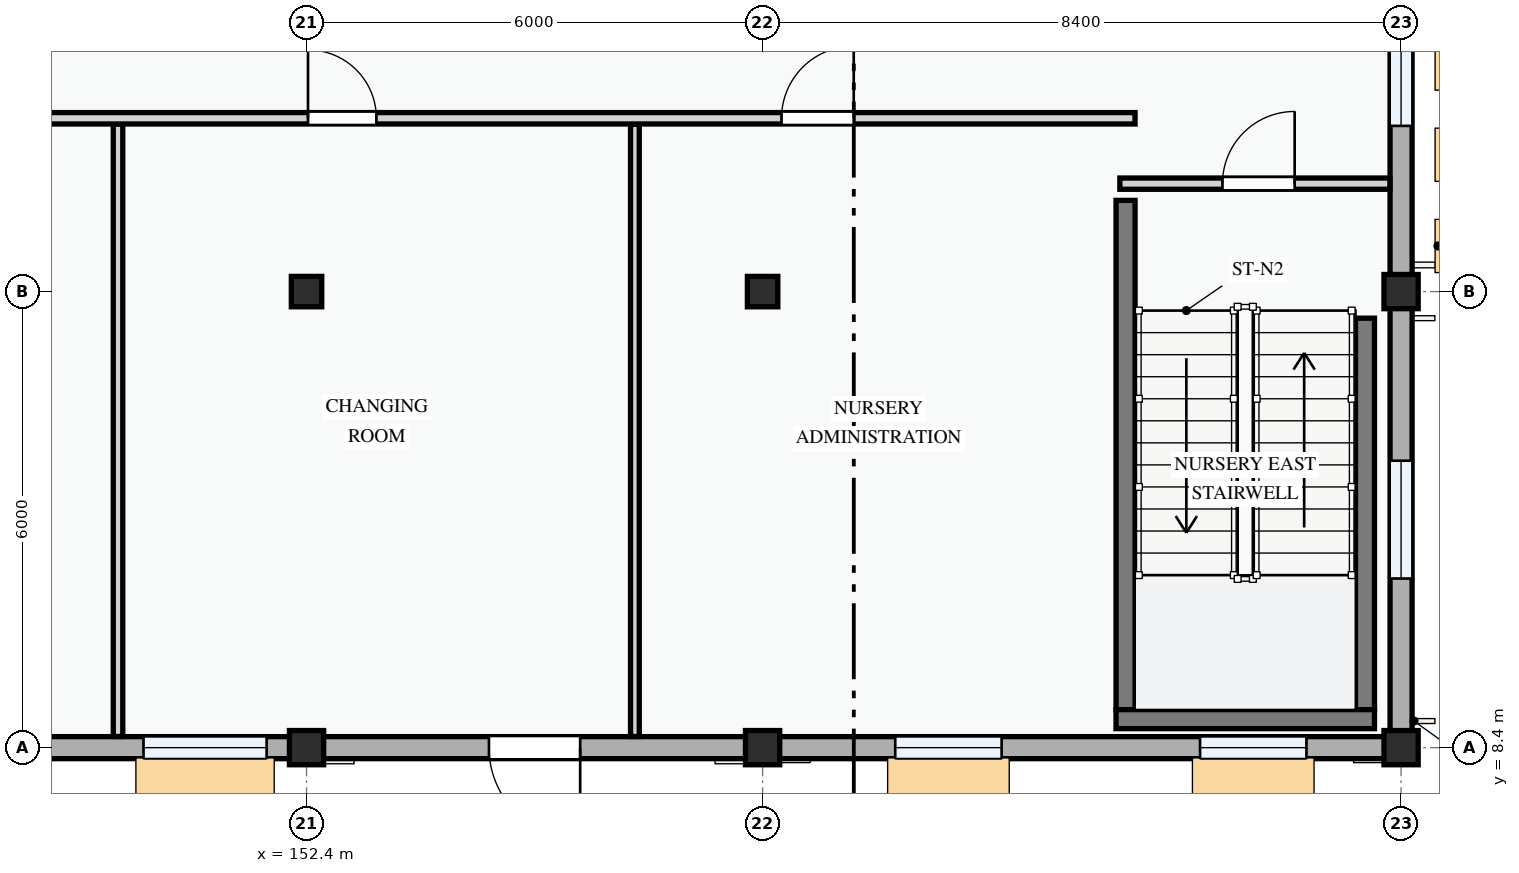
"""IFC4 building model, lengths in metres.
Left out: names, types, materials, properties, quantities, classifications, styles, units other than length and angle.
Written with IfcOpenShell. Run it as: python <this file> out.ifc"""

import sys

from ifc_helpers import new_model, si_unit, direction, frame, frame_2d, origin, origin_2d, place, context, subcontext, project, spatial, rectangle, extrude, element, fill, save


model = new_model("IFC4")
c1 = context("Model", 3, precision=1e-05, world=origin(), true_north=direction((0.0, 1.0)))
c2 = subcontext(c1, "Body", "Model", "MODEL_VIEW")
j1 = project(units=[si_unit("LENGTHUNIT", "METRE"), si_unit("PLANEANGLEUNIT", "RADIAN")], contexts=[c1])
p1 = place(None, origin())
s1 = spatial("IfcSite", under=j1, at=p1, CompositionType="ELEMENT")
p2 = place(p1, origin())
s2 = spatial("IfcBuilding", under=s1, at=p2, CompositionType="ELEMENT")
p3 = place(p2, origin())
s3 = spatial("IfcBuildingStorey", under=s2, at=p3, CompositionType="ELEMENT", Elevation=0.0)
p4 = place(p3, frame((152.4, 8.4, 0.0), z_axis=(0.0, 0.0, 1.0), x_axis=(1.0, 0.0, 0.0)))
e1 = element("IfcColumn", 1, at=p4, inside=s3, PredefinedType="COLUMN", context=c2, shape_type="SweptSolid", body=[
    extrude(rectangle(XDim=0.45, YDim=0.45, at=origin_2d()), origin(), (0.0, 0.0, 1.0), 4.5),
])
p5 = place(p3, frame((152.4, 14.4, 0.0), z_axis=(0.0, 0.0, 1.0), x_axis=(1.0, 0.0, 0.0)))
e2 = element("IfcColumn", 2, at=p5, inside=s3, PredefinedType="COLUMN", context=c2, shape_type="SweptSolid", body=[
    extrude(rectangle(XDim=0.4, YDim=0.4, at=origin_2d()), origin(), (0.0, 0.0, 1.0), 4.5),
])
p6 = place(p3, frame((158.4, 8.4, 0.0), z_axis=(0.0, 0.0, 1.0), x_axis=(1.0, 0.0, 0.0)))
e3 = element("IfcColumn", 3, at=p6, inside=s3, PredefinedType="COLUMN", context=c2, shape_type="SweptSolid", body=[
    extrude(rectangle(XDim=0.45, YDim=0.45, at=origin_2d()), origin(), (0.0, 0.0, 1.0), 4.5),
])
p7 = place(p3, frame((158.4, 14.4, 0.0), z_axis=(0.0, 0.0, 1.0), x_axis=(1.0, 0.0, 0.0)))
e4 = element("IfcColumn", 4, at=p7, inside=s3, PredefinedType="COLUMN", context=c2, shape_type="SweptSolid", body=[
    extrude(rectangle(XDim=0.4, YDim=0.4, at=origin_2d()), origin(), (0.0, 0.0, 1.0), 4.5),
])
for number, where, z_axis, x_axis in (
    (5, (166.8, 8.4, 0.0), (0.0, 0.0, 1.0), (1.0, 0.0, 0.0)),
    (6, (166.8, 14.4, 0.0), (0.0, 0.0, 1.0), (1.0, 0.0, 0.0)),
):
    element("IfcColumn", number, at=place(p3, frame(where, z_axis=z_axis, x_axis=x_axis)), inside=s3, PredefinedType="COLUMN", context=c2, shape_type="SweptSolid", body=[
        extrude(rectangle(XDim=0.45, YDim=0.45, at=origin_2d()), origin(), (0.0, 0.0, 1.0), 4.5),
    ])
p8 = place(p3, frame((144.0, 8.4, 0.0), z_axis=(0.0, 0.0, 1.0), x_axis=(1.0, 0.0, 0.0)))
e7 = element("IfcWall", 7, at=p8, inside=s3, PredefinedType="STANDARD", context=c2, shape_type="SweptSolid", body=[
    extrude(rectangle(XDim=8.4, YDim=0.29, at=frame_2d((4.2, 0.0))), origin(), (0.0, 0.0, 1.0), 3.485),
])
p9 = place(p8, frame((2.455, 0.0, 0.72)))
e8 = element("IfcOpeningElement", 8, at=p9, cuts=e7, PredefinedType="OPENING", context=c2, shape_type="SweptSolid", body=[
    extrude(rectangle(XDim=1.2, YDim=1.35, at=frame_2d((0.6, 0.675))), frame((0.0, 0.155, 0.0), z_axis=(0.0, -1.0, 0.0), x_axis=(1.0, 0.0, 0.0)), (0.0, 0.0, 1.0), 0.31),
])
p10 = place(p8, frame((6.255, 0.0, 0.72)))
e9 = element("IfcOpeningElement", 9, at=p10, cuts=e7, PredefinedType="OPENING", context=c2, shape_type="SweptSolid", body=[
    extrude(rectangle(XDim=1.62, YDim=1.38, at=frame_2d((0.81, 0.69))), frame((0.0, 0.155, 0.0), z_axis=(0.0, -1.0, 0.0), x_axis=(1.0, 0.0, 0.0)), (0.0, 0.0, 1.0), 0.31),
])
p11 = place(p3, frame((152.4, 8.4, 0.0), z_axis=(0.0, 0.0, 1.0), x_axis=(1.0, 0.0, 0.0)))
e10 = element("IfcWall", 10, at=p11, inside=s3, PredefinedType="STANDARD", context=c2, shape_type="SweptSolid", body=[
    extrude(rectangle(XDim=6.0, YDim=0.29, at=frame_2d((3.0, 0.0))), origin(), (0.0, 0.0, 1.0), 3.585),
])
p12 = place(p11, frame((2.4, 0.0, 0.0)))
e11 = element("IfcOpeningElement", 11, at=p12, cuts=e10, PredefinedType="OPENING", context=c2, shape_type="SweptSolid", body=[
    extrude(rectangle(XDim=1.2, YDim=2.2, at=frame_2d((0.6, 1.1))), frame((0.0, 0.155, 0.0), z_axis=(0.0, -1.0, 0.0), x_axis=(1.0, 0.0, 0.0)), (0.0, 0.0, 1.0), 0.31),
])
p13 = place(p3, frame((158.4, 8.4, 0.0), z_axis=(0.0, 0.0, 1.0), x_axis=(1.0, 0.0, 0.0)))
e12 = element("IfcWall", 12, at=p13, inside=s3, PredefinedType="STANDARD", context=c2, shape_type="SweptSolid", body=[
    extrude(rectangle(XDim=8.4, YDim=0.29, at=frame_2d((4.2, 0.0))), origin(), (0.0, 0.0, 1.0), 3.485),
])
p14 = place(p13, frame((1.745, 0.0, 0.72)))
e13 = element("IfcOpeningElement", 13, at=p14, cuts=e12, PredefinedType="OPENING", context=c2, shape_type="SweptSolid", body=[
    extrude(rectangle(XDim=1.4, YDim=1.45, at=frame_2d((0.7, 0.725))), frame((0.0, 0.155, 0.0), z_axis=(0.0, -1.0, 0.0), x_axis=(1.0, 0.0, 0.0)), (0.0, 0.0, 1.0), 0.31),
])
p15 = place(p13, frame((5.755, 0.0, 0.72)))
e14 = element("IfcOpeningElement", 14, at=p15, cuts=e12, PredefinedType="OPENING", context=c2, shape_type="SweptSolid", body=[
    extrude(rectangle(XDim=1.4, YDim=1.45, at=frame_2d((0.7, 0.725))), frame((0.0, 0.155, 0.0), z_axis=(0.0, -1.0, 0.0), x_axis=(1.0, 0.0, 0.0)), (0.0, 0.0, 1.0), 0.31),
])
p16 = place(p3, frame((166.8, 8.4, 0.0), z_axis=(0.0, 0.0, 1.0), x_axis=(0.0, 1.0, 0.0)))
e15 = element("IfcWall", 15, at=p16, inside=s3, PredefinedType="STANDARD", context=c2, shape_type="SweptSolid", body=[
    extrude(rectangle(XDim=6.0, YDim=0.29, at=frame_2d((3.0, 0.0))), origin(), (0.0, 0.0, 1.0), 3.585),
])
p17 = place(p16, frame((2.225, 0.0, 0.72)))
e16 = element("IfcOpeningElement", 16, at=p17, cuts=e15, PredefinedType="OPENING", context=c2, shape_type="SweptSolid", body=[
    extrude(rectangle(XDim=1.55, YDim=1.4, at=frame_2d((0.775, 0.7))), frame((0.0, 0.155, 0.0), z_axis=(0.0, -1.0, 0.0), x_axis=(1.0, 0.0, 0.0)), (0.0, 0.0, 1.0), 0.31),
])
p18 = place(p3, frame((166.8, 14.4, 0.0), z_axis=(0.0, 0.0, 1.0), x_axis=(0.0, 1.0, 0.0)))
e17 = element("IfcWall", 17, at=p18, inside=s3, PredefinedType="STANDARD", context=c2, shape_type="SweptSolid", body=[
    extrude(rectangle(XDim=8.4, YDim=0.29, at=frame_2d((4.2, 0.0))), origin(), (0.0, 0.0, 1.0), 3.485),
])
p19 = place(p18, frame((2.18, 0.0, 0.72)))
e18 = element("IfcOpeningElement", 18, at=p19, cuts=e17, PredefinedType="OPENING", context=c2, shape_type="SweptSolid", body=[
    extrude(rectangle(XDim=1.58, YDim=1.48, at=frame_2d((0.79, 0.74))), frame((0.0, 0.155, 0.0), z_axis=(0.0, -1.0, 0.0), x_axis=(1.0, 0.0, 0.0)), (0.0, 0.0, 1.0), 0.31),
])
p20 = place(p18, frame((5.49, 0.0, 0.72)))
e19 = element("IfcOpeningElement", 19, at=p20, cuts=e17, PredefinedType="OPENING", context=c2, shape_type="SweptSolid", body=[
    extrude(rectangle(XDim=1.75, YDim=1.45, at=frame_2d((0.875, 0.725))), frame((0.0, 0.155, 0.0), z_axis=(0.0, -1.0, 0.0), x_axis=(1.0, 0.0, 0.0)), (0.0, 0.0, 1.0), 0.31),
])
p21 = place(p3, frame((163.175, 15.6, 0.0), z_axis=(0.0, 0.0, 1.0), x_axis=(0.0, -1.0, 0.0)))
e20 = element("IfcWall", 20, at=p21, inside=s3, PredefinedType="SHEAR", context=c2, shape_type="SweptSolid", body=[
    extrude(rectangle(XDim=6.7, YDim=0.25, at=frame_2d((3.35, 0.0))), origin(), (0.0, 0.0, 1.0), 4.2),
])
p22 = place(p3, frame((166.325, 14.05, 0.0), z_axis=(0.0, 0.0, 1.0), x_axis=(0.0, -1.0, 0.0)))
e21 = element("IfcWall", 21, at=p22, inside=s3, PredefinedType="SHEAR", context=c2, shape_type="SweptSolid", body=[
    extrude(rectangle(XDim=5.15, YDim=0.25, at=frame_2d((2.575, 0.0))), origin(), (0.0, 0.0, 1.0), 4.2),
])
p23 = place(p3, frame((163.05, 8.775, 0.0), z_axis=(0.0, 0.0, 1.0), x_axis=(1.0, 0.0, 0.0)))
e22 = element("IfcWall", 22, at=p23, inside=s3, PredefinedType="SHEAR", context=c2, shape_type="SweptSolid", body=[
    extrude(rectangle(XDim=3.4, YDim=0.25, at=frame_2d((1.7, 0.0))), origin(), (0.0, 0.0, 1.0), 4.2),
])
p24 = place(p3, frame((149.92, 8.547, 0.0), z_axis=(0.0, 0.0, 1.0), x_axis=(0.0, 1.0, 0.0)))
e23 = element("IfcWall", 23, at=p24, inside=s3, PredefinedType="PARTITIONING", context=c2, shape_type="SweptSolid", body=[
    extrude(rectangle(XDim=8.056, YDim=0.125, at=frame_2d((4.028, 0.0))), origin(), (0.0, 0.0, 1.0), 4.2),
])
p25 = place(p3, frame((156.72, 8.547, 0.0), z_axis=(0.0, 0.0, 1.0), x_axis=(0.0, 1.0, 0.0)))
e24 = element("IfcWall", 24, at=p25, inside=s3, PredefinedType="PARTITIONING", context=c2, shape_type="SweptSolid", body=[
    extrude(rectangle(XDim=8.056, YDim=0.115, at=frame_2d((4.028, 0.0))), origin(), (0.0, 0.0, 1.0), 4.2),
])
p26 = place(p3, frame((127.1, 16.68, 0.0), z_axis=(0.0, 0.0, 1.0), x_axis=(1.0, 0.0, 0.0)))
e25 = element("IfcWall", 25, at=p26, inside=s3, PredefinedType="PARTITIONING", context=c2, shape_type="SweptSolid", body=[
    extrude(rectangle(XDim=36.2, YDim=0.15, at=frame_2d((18.1, 0.0))), origin(), (0.0, 0.0, 1.0), 4.2),
])
p27 = place(p26, frame((7.878, 0.0, 0.0)))
e26 = element("IfcOpeningElement", 26, at=p27, cuts=e25, PredefinedType="OPENING", context=c2, shape_type="SweptSolid", body=[
    extrude(rectangle(XDim=0.95, YDim=2.1, at=frame_2d((0.475, 1.05))), frame((0.0, 0.085, 0.0), z_axis=(0.0, -1.0, 0.0), x_axis=(1.0, 0.0, 0.0)), (0.0, 0.0, 1.0), 0.17),
])
p28 = place(p26, frame((17.65, 0.0, 0.0)))
e27 = element("IfcOpeningElement", 27, at=p28, cuts=e25, PredefinedType="OPENING", context=c2, shape_type="SweptSolid", body=[
    extrude(rectangle(XDim=0.9, YDim=2.1, at=frame_2d((0.45, 1.05))), frame((0.0, 0.085, 0.0), z_axis=(0.0, -1.0, 0.0), x_axis=(1.0, 0.0, 0.0)), (0.0, 0.0, 1.0), 0.17),
])
p29 = place(p26, frame((25.319, 0.0, 0.0)))
e28 = element("IfcOpeningElement", 28, at=p29, cuts=e25, PredefinedType="OPENING", context=c2, shape_type="SweptSolid", body=[
    extrude(rectangle(XDim=0.9, YDim=2.1, at=frame_2d((0.45, 1.05))), frame((0.0, 0.085, 0.0), z_axis=(0.0, -1.0, 0.0), x_axis=(1.0, 0.0, 0.0)), (0.0, 0.0, 1.0), 0.17),
])
p30 = place(p26, frame((31.549, 0.0, 0.0)))
e29 = element("IfcOpeningElement", 29, at=p30, cuts=e25, PredefinedType="OPENING", context=c2, shape_type="SweptSolid", body=[
    extrude(rectangle(XDim=0.95, YDim=2.1, at=frame_2d((0.475, 1.05))), frame((0.0, 0.085, 0.0), z_axis=(0.0, -1.0, 0.0), x_axis=(1.0, 0.0, 0.0)), (0.0, 0.0, 1.0), 0.17),
])
p31 = place(p3, frame((163.1, 15.82, 0.0), z_axis=(0.0, 0.0, 1.0), x_axis=(1.0, 0.0, 0.0)))
e30 = element("IfcWall", 30, at=p31, inside=s3, PredefinedType="PARTITIONING", context=c2, shape_type="SweptSolid", body=[
    extrude(rectangle(XDim=3.553, YDim=0.148, at=frame_2d((1.776, 0.0))), origin(), (0.0, 0.0, 1.0), 4.2),
])
p32 = place(p31, frame((1.35, 0.0, 0.0)))
e31 = element("IfcOpeningElement", 31, at=p32, cuts=e30, PredefinedType="OPENING", context=c2, shape_type="SweptSolid", body=[
    extrude(rectangle(XDim=0.95, YDim=2.1, at=frame_2d((0.475, 1.05))), frame((0.0, 0.084, 0.0), z_axis=(0.0, -1.0, 0.0), x_axis=(1.0, 0.0, 0.0)), (0.0, 0.0, 1.0), 0.168),
])
p33 = place(p10, origin())
e32 = element("IfcWindow", 32, at=p33, inside=s3, PartitioningType="DOUBLE_PANEL_VERTICAL", PredefinedType="WINDOW", context=c2, shape_type="SweptSolid", body=[
    extrude(rectangle(XDim=1.62, YDim=1.38, at=frame_2d((0.81, 0.69))), frame((0.0, 0.03, 0.0), z_axis=(0.0, -1.0, 0.0), x_axis=(1.0, 0.0, 0.0)), (0.0, 0.0, 1.0), 0.06),
])
fill(e9, e32)
p34 = place(p12, frame((1.2, 0.0, 0.0), z_axis=(0.0, 0.0, 1.0), x_axis=(-1.0, 0.0, 0.0)))
e33 = element("IfcDoor", 33, at=p34, inside=s3, OperationType="SINGLE_SWING_LEFT", PredefinedType="DOOR", context=c2, shape_type="SweptSolid", body=[
    extrude(rectangle(XDim=1.2, YDim=2.2, at=frame_2d((0.6, 1.1))), frame((0.0, 0.025, 0.0), z_axis=(0.0, -1.0, 0.0), x_axis=(1.0, 0.0, 0.0)), (0.0, 0.0, 1.0), 0.05),
])
fill(e11, e33)
p35 = place(p14, origin())
e34 = element("IfcWindow", 34, at=p35, inside=s3, PartitioningType="SINGLE_PANEL", PredefinedType="WINDOW", context=c2, shape_type="SweptSolid", body=[
    extrude(rectangle(XDim=1.4, YDim=1.45, at=frame_2d((0.7, 0.725))), frame((0.0, 0.03, 0.0), z_axis=(0.0, -1.0, 0.0), x_axis=(1.0, 0.0, 0.0)), (0.0, 0.0, 1.0), 0.06),
])
fill(e13, e34)
p36 = place(p15, origin())
e35 = element("IfcWindow", 35, at=p36, inside=s3, PartitioningType="SINGLE_PANEL", PredefinedType="WINDOW", context=c2, shape_type="SweptSolid", body=[
    extrude(rectangle(XDim=1.4, YDim=1.45, at=frame_2d((0.7, 0.725))), frame((0.0, 0.03, 0.0), z_axis=(0.0, -1.0, 0.0), x_axis=(1.0, 0.0, 0.0)), (0.0, 0.0, 1.0), 0.06),
])
fill(e14, e35)
p37 = place(p17, origin())
e36 = element("IfcWindow", 36, at=p37, inside=s3, PartitioningType="SINGLE_PANEL", PredefinedType="WINDOW", context=c2, shape_type="SweptSolid", body=[
    extrude(rectangle(XDim=1.55, YDim=1.4, at=frame_2d((0.775, 0.7))), frame((0.0, 0.03, 0.0), z_axis=(0.0, -1.0, 0.0), x_axis=(1.0, 0.0, 0.0)), (0.0, 0.0, 1.0), 0.06),
])
fill(e16, e36)
p38 = place(p19, origin())
e37 = element("IfcWindow", 37, at=p38, inside=s3, PartitioningType="SINGLE_PANEL", PredefinedType="WINDOW", context=c2, shape_type="SweptSolid", body=[
    extrude(rectangle(XDim=1.58, YDim=1.48, at=frame_2d((0.79, 0.74))), frame((0.0, 0.03, 0.0), z_axis=(0.0, -1.0, 0.0), x_axis=(1.0, 0.0, 0.0)), (0.0, 0.0, 1.0), 0.06),
])
fill(e18, e37)
p39 = place(p29, origin())
e38 = element("IfcDoor", 38, at=p39, inside=s3, OperationType="SINGLE_SWING_LEFT", PredefinedType="DOOR", context=c2, shape_type="SweptSolid", body=[
    extrude(rectangle(XDim=0.9, YDim=2.1, at=frame_2d((0.45, 1.05))), frame((0.0, 0.025, 0.0), z_axis=(0.0, -1.0, 0.0), x_axis=(1.0, 0.0, 0.0)), (0.0, 0.0, 1.0), 0.05),
])
fill(e28, e38)
p40 = place(p30, origin())
e39 = element("IfcDoor", 39, at=p40, inside=s3, OperationType="SINGLE_SWING_RIGHT", PredefinedType="DOOR", context=c2, shape_type="SweptSolid", body=[
    extrude(rectangle(XDim=0.95, YDim=2.1, at=frame_2d((0.475, 1.05))), frame((0.0, 0.025, 0.0), z_axis=(0.0, -1.0, 0.0), x_axis=(1.0, 0.0, 0.0)), (0.0, 0.0, 1.0), 0.05),
])
fill(e29, e39)
p41 = place(p32, origin())
e40 = element("IfcDoor", 40, at=p41, inside=s3, OperationType="SINGLE_SWING_RIGHT", PredefinedType="DOOR", context=c2, shape_type="SweptSolid", body=[
    extrude(rectangle(XDim=0.95, YDim=2.1, at=frame_2d((0.475, 1.05))), frame((0.0, 0.025, 0.0), z_axis=(0.0, -1.0, 0.0), x_axis=(1.0, 0.0, 0.0)), (0.0, 0.0, 1.0), 0.05),
])
fill(e31, e40)
save(model, sys.argv[1])
